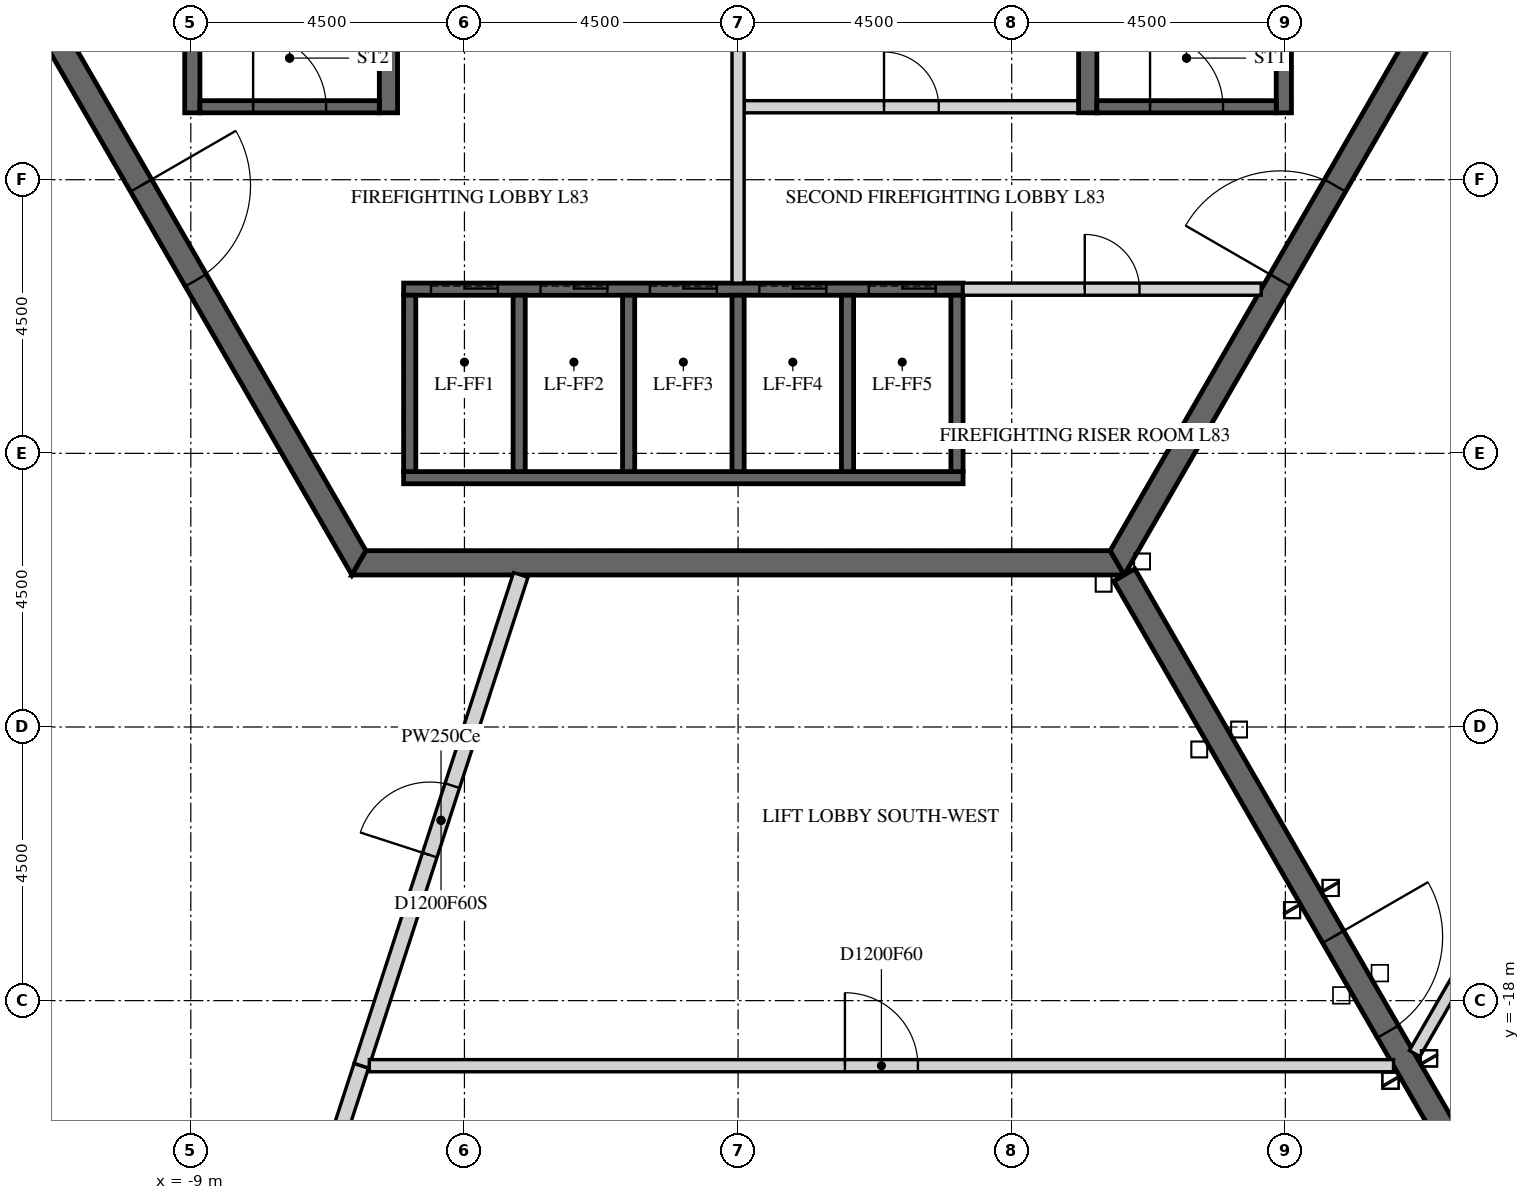
"""IFC4 building model, lengths in metres.
Left out: names, types, materials, properties, quantities, classifications, styles, units other than length and angle.
Written with IfcOpenShell. Run it as: python <this file> out.ifc"""

import sys

from ifc_helpers import new_model, si_unit, direction, frame, frame_2d, origin, place, context, subcontext, project, spatial, polyline, rectangle, outline, extrude, element, fill, save


model = new_model("IFC4")
c1 = context("Model", 3, precision=1e-05, world=origin(), true_north=direction((0.0, 1.0)))
c2 = subcontext(c1, "Body", "Model", "MODEL_VIEW")
j1 = project(units=[si_unit("LENGTHUNIT", "METRE"), si_unit("PLANEANGLEUNIT", "RADIAN")], contexts=[c1])
p1 = place(None, origin())
s1 = spatial("IfcSite", under=j1, at=p1, CompositionType="ELEMENT")
p2 = place(p1, origin())
s2 = spatial("IfcBuilding", under=s1, at=p2, CompositionType="ELEMENT")
p3 = place(p2, frame((0.0, 0.0, 343.5)))
s3 = spatial("IfcBuildingStorey", under=s2, at=p3, CompositionType="ELEMENT", Elevation=343.5)
p4 = place(p3, frame((-12.471, 0.0, -0.3), z_axis=(0.0, 0.0, 1.0), x_axis=(0.499996419489, -0.866027470984, 0.0)))
e1 = element("IfcWall", 1, at=p4, inside=s3, PredefinedType="SHEAR", context=c2, shape_type="SweptSolid", body=[
    extrude(outline(polyline([(-0.115, -0.2), (12.586, -0.2), (12.355, 0.2), (0.115, 0.2), (-0.115, -0.2)])), origin(), (0.0, 0.0, 1.0), 5.8),
])
p5 = place(p4, frame((5.306, 0.0, 0.3)))
e2 = element("IfcOpeningElement", 2, at=p5, cuts=e1, PredefinedType="OPENING", context=c2, shape_type="SweptSolid", body=[
    extrude(rectangle(XDim=1.8, YDim=2.4, at=frame_2d((0.9, 1.2))), frame((0.0, 0.21, 0.0), z_axis=(0.0, -1.0, 0.0), x_axis=(1.0, 0.0, 0.0)), (0.0, 0.0, 1.0), 0.42),
])
p6 = place(p3, frame((-6.235, -10.8, -0.3), z_axis=(0.0, 0.0, 1.0), x_axis=(1.0, 0.0, 0.0)))
e3 = element("IfcWall", 3, at=p6, inside=s3, PredefinedType="SHEAR", context=c2, shape_type="SweptSolid", body=[
    extrude(outline(polyline([(-0.115, -0.2), (12.586, -0.2), (12.355, 0.2), (0.115, 0.2), (-0.115, -0.2)])), origin(), (0.0, 0.0, 1.0), 5.8),
])
p7 = place(p3, frame((6.235, -10.8, -0.3), z_axis=(0.0, 0.0, 1.0), x_axis=(0.499996419489, 0.866027470984, 0.0)))
e4 = element("IfcWall", 4, at=p7, inside=s3, PredefinedType="SHEAR", context=c2, shape_type="SweptSolid", body=[
    extrude(outline(polyline([(-0.115, -0.2), (12.586, -0.2), (12.355, 0.2), (0.115, 0.2), (-0.115, -0.2)])), origin(), (0.0, 0.0, 1.0), 5.8),
])
p8 = place(p7, frame((5.364, 0.0, 0.3)))
e5 = element("IfcOpeningElement", 5, at=p8, cuts=e4, PredefinedType="OPENING", context=c2, shape_type="SweptSolid", body=[
    extrude(rectangle(XDim=1.8, YDim=2.4, at=frame_2d((0.9, 1.2))), frame((0.0, 0.21, 0.0), z_axis=(0.0, -1.0, 0.0), x_axis=(1.0, 0.0, 0.0)), (0.0, 0.0, 1.0), 0.42),
])
p9 = place(p3, frame((6.351, -11.0, -0.3), z_axis=(0.0, 0.0, 1.0), x_axis=(0.499998894578, -0.866026041999, 0.0)))
e6 = element("IfcWall", 6, at=p9, inside=s3, PredefinedType="SHEAR", context=c2, shape_type="SweptSolid", body=[
    extrude(rectangle(XDim=15.544, YDim=0.4, at=frame_2d((7.772, 0.0))), origin(), (0.0, 0.0, 1.0), 5.8),
])
p10 = place(p9, frame((6.872, 0.0, 0.3)))
e7 = element("IfcOpeningElement", 7, at=p10, cuts=e6, PredefinedType="OPENING", context=c2, shape_type="SweptSolid", body=[
    extrude(rectangle(XDim=1.8, YDim=2.4, at=frame_2d((0.9, 1.2))), frame((0.0, 0.21, 0.0), z_axis=(0.0, -1.0, 0.0), x_axis=(1.0, 0.0, 0.0)), (0.0, 0.0, 1.0), 0.42),
])
p11 = place(p3, frame((-5.5, -6.3, -0.25), z_axis=(0.0, 0.0, 1.0), x_axis=(1.0, 0.0, 0.0)))
e8 = element("IfcWall", 8, at=p11, inside=s3, PredefinedType="SHEAR", context=c2, shape_type="SweptSolid", body=[
    extrude(rectangle(XDim=9.2, YDim=0.2, at=frame_2d((4.6, 0.0))), origin(), (0.0, 0.0, 1.0), 5.75),
])
p12 = place(p11, frame((0.45, 0.0, 0.25)))
e9 = element("IfcOpeningElement", 9, at=p12, cuts=e8, PredefinedType="OPENING", context=c2, shape_type="SweptSolid", body=[
    extrude(rectangle(XDim=1.1, YDim=2.1, at=frame_2d((0.55, 1.05))), frame((0.0, 0.11, 0.0), z_axis=(0.0, -1.0, 0.0), x_axis=(1.0, 0.0, 0.0)), (0.0, 0.0, 1.0), 0.22),
])
p13 = place(p11, frame((2.25, 0.0, 0.25)))
e10 = element("IfcOpeningElement", 10, at=p13, cuts=e8, PredefinedType="OPENING", context=c2, shape_type="SweptSolid", body=[
    extrude(rectangle(XDim=1.1, YDim=2.1, at=frame_2d((0.55, 1.05))), frame((0.0, 0.11, 0.0), z_axis=(0.0, -1.0, 0.0), x_axis=(1.0, 0.0, 0.0)), (0.0, 0.0, 1.0), 0.22),
])
p14 = place(p11, frame((4.05, 0.0, 0.25)))
e11 = element("IfcOpeningElement", 11, at=p14, cuts=e8, PredefinedType="OPENING", context=c2, shape_type="SweptSolid", body=[
    extrude(rectangle(XDim=1.1, YDim=2.1, at=frame_2d((0.55, 1.05))), frame((0.0, 0.11, 0.0), z_axis=(0.0, -1.0, 0.0), x_axis=(1.0, 0.0, 0.0)), (0.0, 0.0, 1.0), 0.22),
])
p15 = place(p11, frame((5.85, 0.0, 0.25)))
e12 = element("IfcOpeningElement", 12, at=p15, cuts=e8, PredefinedType="OPENING", context=c2, shape_type="SweptSolid", body=[
    extrude(rectangle(XDim=1.1, YDim=2.1, at=frame_2d((0.55, 1.05))), frame((0.0, 0.11, 0.0), z_axis=(0.0, -1.0, 0.0), x_axis=(1.0, 0.0, 0.0)), (0.0, 0.0, 1.0), 0.22),
])
p16 = place(p11, frame((7.65, 0.0, 0.25)))
e13 = element("IfcOpeningElement", 13, at=p16, cuts=e8, PredefinedType="OPENING", context=c2, shape_type="SweptSolid", body=[
    extrude(rectangle(XDim=1.1, YDim=2.1, at=frame_2d((0.55, 1.05))), frame((0.0, 0.11, 0.0), z_axis=(0.0, -1.0, 0.0), x_axis=(1.0, 0.0, 0.0)), (0.0, 0.0, 1.0), 0.22),
])
p17 = place(p3, frame((-5.5, -9.4, -0.25), z_axis=(0.0, 0.0, 1.0), x_axis=(1.0, 0.0, 0.0)))
e14 = element("IfcWall", 14, at=p17, inside=s3, PredefinedType="SHEAR", context=c2, shape_type="SweptSolid", body=[
    extrude(rectangle(XDim=9.2, YDim=0.2, at=frame_2d((4.6, 0.0))), origin(), (0.0, 0.0, 1.0), 5.75),
])
for number, where, z_axis, x_axis in (
    (15, (-5.4, -9.3, -0.25), (0.0, 0.0, 1.0), (0.0, 1.0, 0.0)),
    (16, (-3.6, -9.3, -0.25), (0.0, 0.0, 1.0), (0.0, 1.0, 0.0)),
    (17, (-1.8, -9.3, -0.25), (0.0, 0.0, 1.0), (0.0, 1.0, 0.0)),
    (18, (0.0, -9.3, -0.25), (0.0, 0.0, 1.0), (0.0, 1.0, 0.0)),
    (19, (1.8, -9.3, -0.25), (0.0, 0.0, 1.0), (0.0, 1.0, 0.0)),
    (20, (3.6, -9.3, -0.25), (0.0, 0.0, 1.0), (0.0, 1.0, 0.0)),
):
    element("IfcWall", number, at=place(p3, frame(where, z_axis=z_axis, x_axis=x_axis)), inside=s3, PredefinedType="SHEAR", context=c2, shape_type="SweptSolid", body=[
        extrude(rectangle(XDim=2.9, YDim=0.2, at=frame_2d((1.45, 0.0))), origin(), (0.0, 0.0, 1.0), 5.75),
    ])
p18 = place(p3, frame((0.1, -3.3, 0.0), z_axis=(0.0, 0.0, 1.0), x_axis=(1.0, 0.0, 0.0)))
e21 = element("IfcWall", 21, at=p18, inside=s3, PredefinedType="PARTITIONING", context=c2, shape_type="SweptSolid", body=[
    extrude(rectangle(XDim=5.5, YDim=0.2, at=frame_2d((2.75, 0.0))), origin(), (0.0, 0.0, 1.0), 5.5),
])
p19 = place(p18, frame((2.3, 0.0, 0.0)))
e22 = element("IfcOpeningElement", 22, at=p19, cuts=e21, PredefinedType="OPENING", context=c2, shape_type="SweptSolid", body=[
    extrude(rectangle(XDim=0.9, YDim=2.1, at=frame_2d((0.45, 1.05))), frame((0.0, 0.11, 0.0), z_axis=(0.0, -1.0, 0.0), x_axis=(1.0, 0.0, 0.0)), (0.0, 0.0, 1.0), 0.22),
])
p20 = place(p3, frame((0.0, -6.2, 0.0), z_axis=(0.0, 0.0, 1.0), x_axis=(0.0, 1.0, 0.0)))
e23 = element("IfcWall", 23, at=p20, inside=s3, PredefinedType="PARTITIONING", context=c2, shape_type="SweptSolid", body=[
    extrude(rectangle(XDim=6.1, YDim=0.2, at=frame_2d((3.05, 0.0))), origin(), (0.0, 0.0, 1.0), 5.5),
])
p21 = place(p3, frame((3.7, -6.3, 0.0), z_axis=(0.0, 0.0, 1.0), x_axis=(1.0, 0.0, 0.0)))
e24 = element("IfcWall", 24, at=p21, inside=s3, PredefinedType="PARTITIONING", context=c2, shape_type="SweptSolid", body=[
    extrude(rectangle(XDim=4.903, YDim=0.2, at=frame_2d((2.451, 0.0))), origin(), (0.0, 0.0, 1.0), 5.5),
])
p22 = place(p21, frame((2.001, 0.0, 0.0)))
e25 = element("IfcOpeningElement", 25, at=p22, cuts=e24, PredefinedType="OPENING", context=c2, shape_type="SweptSolid", body=[
    extrude(rectangle(XDim=0.9, YDim=2.1, at=frame_2d((0.45, 1.05))), frame((0.0, 0.11, 0.0), z_axis=(0.0, -1.0, 0.0), x_axis=(1.0, 0.0, 0.0)), (0.0, 0.0, 1.0), 0.22),
])
p23 = place(p3, frame((5.75, -3.4, -0.25), z_axis=(0.0, 0.0, 1.0), x_axis=(0.0, 1.0, 0.0)))
e26 = element("IfcWall", 26, at=p23, inside=s3, PredefinedType="SHEAR", context=c2, shape_type="SweptSolid", body=[
    extrude(rectangle(XDim=6.8, YDim=0.3, at=frame_2d((3.4, 0.0))), origin(), (0.0, 0.0, 1.0), 5.75),
])
p24 = place(p3, frame((8.975, -3.4, -0.25), z_axis=(0.0, 0.0, 1.0), x_axis=(0.0, 1.0, 0.0)))
e27 = element("IfcWall", 27, at=p24, inside=s3, PredefinedType="SHEAR", context=c2, shape_type="SweptSolid", body=[
    extrude(rectangle(XDim=6.8, YDim=0.25, at=frame_2d((3.4, 0.0))), origin(), (0.0, 0.0, 1.0), 5.75),
])
p25 = place(p3, frame((5.9, -3.3, -0.25), z_axis=(0.0, 0.0, 1.0), x_axis=(1.0, 0.0, 0.0)))
e28 = element("IfcWall", 28, at=p25, inside=s3, PredefinedType="SHEAR", context=c2, shape_type="SweptSolid", body=[
    extrude(rectangle(XDim=2.95, YDim=0.2, at=frame_2d((1.475, 0.0))), origin(), (0.0, 0.0, 1.0), 5.75),
])
p26 = place(p25, frame((0.875, 0.0, 0.25)))
e29 = element("IfcOpeningElement", 29, at=p26, cuts=e28, PredefinedType="OPENING", context=c2, shape_type="SweptSolid", body=[
    extrude(rectangle(XDim=1.2, YDim=2.4, at=frame_2d((0.6, 1.2))), frame((0.0, 0.11, 0.0), z_axis=(0.0, -1.0, 0.0), x_axis=(1.0, 0.0, 0.0)), (0.0, 0.0, 1.0), 0.22),
])
p27 = place(p3, frame((-5.75, -3.4, -0.25), z_axis=(0.0, 0.0, 1.0), x_axis=(0.0, 1.0, 0.0)))
e30 = element("IfcWall", 30, at=p27, inside=s3, PredefinedType="SHEAR", context=c2, shape_type="SweptSolid", body=[
    extrude(rectangle(XDim=6.8, YDim=0.3, at=frame_2d((3.4, 0.0))), origin(), (0.0, 0.0, 1.0), 5.75),
])
p28 = place(p3, frame((-8.975, -3.4, -0.25), z_axis=(0.0, 0.0, 1.0), x_axis=(0.0, 1.0, 0.0)))
e31 = element("IfcWall", 31, at=p28, inside=s3, PredefinedType="SHEAR", context=c2, shape_type="SweptSolid", body=[
    extrude(rectangle(XDim=6.8, YDim=0.25, at=frame_2d((3.4, 0.0))), origin(), (0.0, 0.0, 1.0), 5.75),
])
p29 = place(p3, frame((-8.85, -3.3, -0.25), z_axis=(0.0, 0.0, 1.0), x_axis=(1.0, 0.0, 0.0)))
e32 = element("IfcWall", 32, at=p29, inside=s3, PredefinedType="SHEAR", context=c2, shape_type="SweptSolid", body=[
    extrude(rectangle(XDim=2.95, YDim=0.2, at=frame_2d((1.475, 0.0))), origin(), (0.0, 0.0, 1.0), 5.75),
])
p30 = place(p29, frame((0.875, 0.0, 0.25)))
e33 = element("IfcOpeningElement", 33, at=p30, cuts=e32, PredefinedType="OPENING", context=c2, shape_type="SweptSolid", body=[
    extrude(rectangle(XDim=1.2, YDim=2.4, at=frame_2d((0.6, 1.2))), frame((0.0, 0.11, 0.0), z_axis=(0.0, -1.0, 0.0), x_axis=(1.0, 0.0, 0.0)), (0.0, 0.0, 1.0), 0.22),
])
p31 = place(p3, frame((-7.106, -21.87, 0.0), z_axis=(0.0, 0.0, 1.0), x_axis=(0.309054196713, 0.951044427718, 0.0)))
e34 = element("IfcWall", 34, at=p31, inside=s3, PredefinedType="PARTITIONING", context=c2, shape_type="SweptSolid", body=[
    extrude(rectangle(XDim=2.944, YDim=0.25, at=frame_2d((1.472, 0.0))), origin(), (0.0, 0.0, 1.0), 5.5),
])
p32 = place(p3, frame((-6.196, -19.07, 0.0), z_axis=(0.0, 0.0, 1.0), x_axis=(0.309011254429, 0.951058381298, 0.0)))
e35 = element("IfcWall", 35, at=p32, inside=s3, PredefinedType="PARTITIONING", context=c2, shape_type="SweptSolid", body=[
    extrude(rectangle(XDim=8.485, YDim=0.25, at=frame_2d((4.243, 0.0))), origin(), (0.0, 0.0, 1.0), 5.5),
])
p33 = place(p32, frame((3.643, 0.0, 0.0)))
e36 = element("IfcOpeningElement", 36, at=p33, cuts=e35, PredefinedType="OPENING", context=c2, shape_type="SweptSolid", body=[
    extrude(rectangle(XDim=1.2, YDim=2.1, at=frame_2d((0.6, 1.05))), frame((0.0, 0.135, 0.0), z_axis=(0.0, -1.0, 0.0), x_axis=(1.0, 0.0, 0.0)), (0.0, 0.0, 1.0), 0.27),
])
p34 = place(p3, frame((-6.064, -19.07, 0.0), z_axis=(0.0, 0.0, 1.0), x_axis=(1.0, 0.0, 0.0)))
e37 = element("IfcWall", 37, at=p34, inside=s3, PredefinedType="PARTITIONING", context=c2, shape_type="SweptSolid", body=[
    extrude(rectangle(XDim=16.844, YDim=0.2, at=frame_2d((8.422, 0.0))), origin(), (0.0, 0.0, 1.0), 5.5),
])
p35 = place(p34, frame((7.822, 0.0, 0.0)))
e38 = element("IfcOpeningElement", 38, at=p35, cuts=e37, PredefinedType="OPENING", context=c2, shape_type="SweptSolid", body=[
    extrude(rectangle(XDim=1.2, YDim=2.1, at=frame_2d((0.6, 1.05))), frame((0.0, 0.11, 0.0), z_axis=(0.0, -1.0, 0.0), x_axis=(1.0, 0.0, 0.0)), (0.0, 0.0, 1.0), 0.22),
])
p36 = place(p3, frame((11.126, -18.87, 0.0), z_axis=(0.0, 0.0, 1.0), x_axis=(0.499978511878, 0.866037809602, 0.0)))
e39 = element("IfcWall", 39, at=p36, inside=s3, PredefinedType="PARTITIONING", context=c2, shape_type="SweptSolid", body=[
    extrude(rectangle(XDim=21.789, YDim=0.2, at=frame_2d((10.895, 0.0))), origin(), (0.0, 0.0, 1.0), 4.573),
])
p37 = place(p36, frame((10.294, 0.0, 0.0)))
e40 = element("IfcOpeningElement", 40, at=p37, cuts=e39, PredefinedType="OPENING", context=c2, shape_type="SweptSolid", body=[
    extrude(rectangle(XDim=1.2, YDim=2.1, at=frame_2d((0.6, 1.05))), frame((0.0, 0.11, 0.0), z_axis=(0.0, -1.0, 0.0), x_axis=(1.0, 0.0, 0.0)), (0.0, 0.0, 1.0), 0.22),
])
p38 = place(p5, origin())
e41 = element("IfcDoor", 41, at=p38, inside=s3, OperationType="DOUBLE_DOOR_SINGLE_SWING", PredefinedType="DOOR", context=c2, shape_type="SweptSolid", body=[
    extrude(rectangle(XDim=1.8, YDim=2.4, at=frame_2d((0.9, 1.2))), frame((0.0, 0.025, 0.0), z_axis=(0.0, -1.0, 0.0), x_axis=(1.0, 0.0, 0.0)), (0.0, 0.0, 1.0), 0.05),
])
fill(e2, e41)
p39 = place(p8, origin())
e42 = element("IfcDoor", 42, at=p39, inside=s3, OperationType="DOUBLE_DOOR_SINGLE_SWING", PredefinedType="DOOR", context=c2, shape_type="SweptSolid", body=[
    extrude(rectangle(XDim=1.8, YDim=2.4, at=frame_2d((0.9, 1.2))), frame((0.0, 0.025, 0.0), z_axis=(0.0, -1.0, 0.0), x_axis=(1.0, 0.0, 0.0)), (0.0, 0.0, 1.0), 0.05),
])
fill(e5, e42)
p40 = place(p10, origin())
e43 = element("IfcDoor", 43, at=p40, inside=s3, OperationType="DOUBLE_DOOR_SINGLE_SWING", PredefinedType="DOOR", context=c2, shape_type="SweptSolid", body=[
    extrude(rectangle(XDim=1.8, YDim=2.4, at=frame_2d((0.9, 1.2))), frame((0.0, 0.025, 0.0), z_axis=(0.0, -1.0, 0.0), x_axis=(1.0, 0.0, 0.0)), (0.0, 0.0, 1.0), 0.05),
])
fill(e7, e43)
p41 = place(p19, origin())
e44 = element("IfcDoor", 44, at=p41, inside=s3, OperationType="SINGLE_SWING_LEFT", PredefinedType="DOOR", context=c2, shape_type="SweptSolid", body=[
    extrude(rectangle(XDim=0.9, YDim=2.1, at=frame_2d((0.45, 1.05))), frame((0.0, 0.025, 0.0), z_axis=(0.0, -1.0, 0.0), x_axis=(1.0, 0.0, 0.0)), (0.0, 0.0, 1.0), 0.05),
])
fill(e22, e44)
p42 = place(p22, origin())
e45 = element("IfcDoor", 45, at=p42, inside=s3, OperationType="SINGLE_SWING_LEFT", PredefinedType="DOOR", context=c2, shape_type="SweptSolid", body=[
    extrude(rectangle(XDim=0.9, YDim=2.1, at=frame_2d((0.45, 1.05))), frame((0.0, 0.025, 0.0), z_axis=(0.0, -1.0, 0.0), x_axis=(1.0, 0.0, 0.0)), (0.0, 0.0, 1.0), 0.05),
])
fill(e25, e45)
p43 = place(p26, origin())
e46 = element("IfcDoor", 46, at=p43, inside=s3, OperationType="SINGLE_SWING_LEFT", PredefinedType="DOOR", context=c2, shape_type="SweptSolid", body=[
    extrude(rectangle(XDim=1.2, YDim=2.4, at=frame_2d((0.6, 1.2))), frame((0.0, 0.025, 0.0), z_axis=(0.0, -1.0, 0.0), x_axis=(1.0, 0.0, 0.0)), (0.0, 0.0, 1.0), 0.05),
])
fill(e29, e46)
p44 = place(p30, origin())
e47 = element("IfcDoor", 47, at=p44, inside=s3, OperationType="SINGLE_SWING_LEFT", PredefinedType="DOOR", context=c2, shape_type="SweptSolid", body=[
    extrude(rectangle(XDim=1.2, YDim=2.4, at=frame_2d((0.6, 1.2))), frame((0.0, 0.025, 0.0), z_axis=(0.0, -1.0, 0.0), x_axis=(1.0, 0.0, 0.0)), (0.0, 0.0, 1.0), 0.05),
])
fill(e33, e47)
p45 = place(p12, origin())
e48 = element("IfcDoor", 48, at=p45, inside=s3, OperationType="SLIDING_TO_LEFT", PredefinedType="DOOR", context=c2, shape_type="SweptSolid", body=[
    extrude(rectangle(XDim=1.1, YDim=2.1, at=frame_2d((0.55, 1.05))), frame((0.0, 0.025, 0.0), z_axis=(0.0, -1.0, 0.0), x_axis=(1.0, 0.0, 0.0)), (0.0, 0.0, 1.0), 0.05),
])
fill(e9, e48)
p46 = place(p13, origin())
e49 = element("IfcDoor", 49, at=p46, inside=s3, OperationType="SLIDING_TO_LEFT", PredefinedType="DOOR", context=c2, shape_type="SweptSolid", body=[
    extrude(rectangle(XDim=1.1, YDim=2.1, at=frame_2d((0.55, 1.05))), frame((0.0, 0.025, 0.0), z_axis=(0.0, -1.0, 0.0), x_axis=(1.0, 0.0, 0.0)), (0.0, 0.0, 1.0), 0.05),
])
fill(e10, e49)
p47 = place(p14, origin())
e50 = element("IfcDoor", 50, at=p47, inside=s3, OperationType="SLIDING_TO_LEFT", PredefinedType="DOOR", context=c2, shape_type="SweptSolid", body=[
    extrude(rectangle(XDim=1.1, YDim=2.1, at=frame_2d((0.55, 1.05))), frame((0.0, 0.025, 0.0), z_axis=(0.0, -1.0, 0.0), x_axis=(1.0, 0.0, 0.0)), (0.0, 0.0, 1.0), 0.05),
])
fill(e11, e50)
p48 = place(p15, origin())
e51 = element("IfcDoor", 51, at=p48, inside=s3, OperationType="SLIDING_TO_LEFT", PredefinedType="DOOR", context=c2, shape_type="SweptSolid", body=[
    extrude(rectangle(XDim=1.1, YDim=2.1, at=frame_2d((0.55, 1.05))), frame((0.0, 0.025, 0.0), z_axis=(0.0, -1.0, 0.0), x_axis=(1.0, 0.0, 0.0)), (0.0, 0.0, 1.0), 0.05),
])
fill(e12, e51)
p49 = place(p16, origin())
e52 = element("IfcDoor", 52, at=p49, inside=s3, OperationType="SLIDING_TO_LEFT", PredefinedType="DOOR", context=c2, shape_type="SweptSolid", body=[
    extrude(rectangle(XDim=1.1, YDim=2.1, at=frame_2d((0.55, 1.05))), frame((0.0, 0.025, 0.0), z_axis=(0.0, -1.0, 0.0), x_axis=(1.0, 0.0, 0.0)), (0.0, 0.0, 1.0), 0.05),
])
fill(e13, e52)
p50 = place(p33, origin())
e53 = element("IfcDoor", 53, at=p50, inside=s3, OperationType="SINGLE_SWING_RIGHT", PredefinedType="DOOR", context=c2, shape_type="SweptSolid", body=[
    extrude(rectangle(XDim=1.2, YDim=2.1, at=frame_2d((0.6, 1.05))), frame((0.0, 0.025, 0.0), z_axis=(0.0, -1.0, 0.0), x_axis=(1.0, 0.0, 0.0)), (0.0, 0.0, 1.0), 0.05),
])
fill(e36, e53)
p51 = place(p35, origin())
e54 = element("IfcDoor", 54, at=p51, inside=s3, OperationType="SINGLE_SWING_LEFT", PredefinedType="DOOR", context=c2, shape_type="SweptSolid", body=[
    extrude(rectangle(XDim=1.2, YDim=2.1, at=frame_2d((0.6, 1.05))), frame((0.0, 0.025, 0.0), z_axis=(0.0, -1.0, 0.0), x_axis=(1.0, 0.0, 0.0)), (0.0, 0.0, 1.0), 0.05),
])
fill(e38, e54)
save(model, sys.argv[1])
